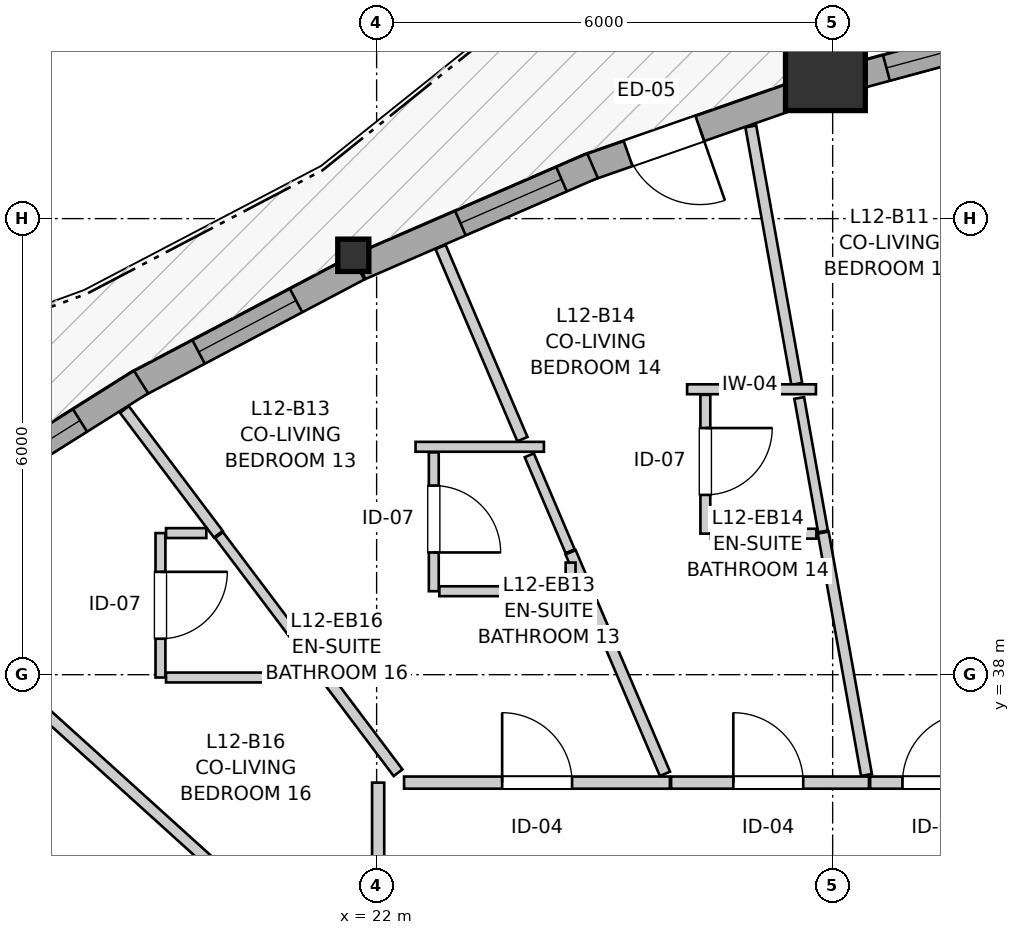
"""IFC4 building model, lengths in metres.
Left out: names, types, materials, properties, quantities, classifications, styles, units other than length and angle.
Written with IfcOpenShell. Run it as: python <this file> out.ifc"""

import sys

from ifc_helpers import new_model, si_unit, direction, frame, frame_2d, origin, origin_2d, place, context, subcontext, project, spatial, rectangle, i_section, extrude, source, transform, mapped, element, fill, save


model = new_model("IFC4")
c1 = context("Model", 3, precision=1e-05, world=origin(), true_north=direction((0.0, 1.0)))
c2 = subcontext(c1, "Body", "Model", "MODEL_VIEW")
j1 = project(units=[si_unit("LENGTHUNIT", "METRE"), si_unit("PLANEANGLEUNIT", "RADIAN")], contexts=[c1])
p1 = place(None, origin())
s1 = spatial("IfcSite", under=j1, at=p1, CompositionType="ELEMENT")
p2 = place(p1, origin())
s2 = spatial("IfcBuilding", under=s1, at=p2, CompositionType="ELEMENT")
p3 = place(p2, frame((0.0, 0.0, 43.0)))
s3 = spatial("IfcBuildingStorey", under=s2, at=p3, CompositionType="ELEMENT", Elevation=43.0)
m1 = source(origin(), c2, "Body", "SweptSolid", [
    extrude(rectangle(XDim=1.05, YDim=1.05, at=origin_2d()), origin(), (0.0, 0.0, 1.0), 2.94),
])
p4 = place(p3, frame((27.905, 45.947, 0.0), z_axis=(0.0, 0.0, 1.0), x_axis=(1.0, 0.0, 0.0)))
e1 = element("IfcColumn", 1, at=p4, inside=s3, PredefinedType="COLUMN", context=c2, shape_type="MappedRepresentation", body=[
    mapped(m1, transform((0.0, 0.0, 0.0), x_axis=(1.0, 0.0, 0.0), y_axis=(0.0, 1.0, 0.0), z_axis=(0.0, 0.0, 1.0), scale=1.0)),
])
m2 = source(origin(), c2, "Body", "SweptSolid", [
    extrude(i_section(OverallWidth=0.409, OverallDepth=0.425, WebThickness=0.03, FlangeThickness=0.048, FilletRadius=0.015, at=origin_2d()), origin(), (0.0, 0.0, 1.0), 2.94),
])
p5 = place(p3, frame((21.693, 43.518, 0.0), z_axis=(0.0, 0.0, 1.0), x_axis=(1.0, 0.0, 0.0)))
e2 = element("IfcColumn", 2, at=p5, inside=s3, PredefinedType="PILASTER", context=c2, shape_type="MappedRepresentation", body=[
    mapped(m2, transform((0.0, 0.0, 0.0), x_axis=(1.0, 0.0, 0.0), y_axis=(0.0, 1.0, 0.0), z_axis=(0.0, 0.0, 1.0), scale=1.0)),
])
p6 = place(p3, frame((31.281, 46.677, 0.0), z_axis=(0.0, 0.0, 1.0), x_axis=(-0.965445661484, -0.260604441101, 0.0)))
e3 = element("IfcWall", 3, at=p6, inside=s3, PredefinedType="SOLIDWALL", context=c2, shape_type="SweptSolid", body=[
    extrude(rectangle(XDim=3.15, YDim=0.35, at=frame_2d((1.575, 0.0))), origin(), (0.0, 0.0, 1.0), 2.42),
])
p7 = place(p6, frame((0.31, 0.0, 0.82)))
e4 = element("IfcOpeningElement", 4, at=p7, cuts=e3, PredefinedType="OPENING", context=c2, shape_type="SweptSolid", body=[
    extrude(rectangle(XDim=0.58, YDim=1.35, at=frame_2d((0.29, 0.675))), frame((0.0, 0.185, 0.0), z_axis=(0.0, -1.0, 0.0), x_axis=(1.0, 0.0, 0.0)), (0.0, 0.0, 1.0), 0.37),
])
p8 = place(p6, frame((1.215, 0.0, 0.82)))
e5 = element("IfcOpeningElement", 5, at=p8, cuts=e3, PredefinedType="OPENING", context=c2, shape_type="SweptSolid", body=[
    extrude(rectangle(XDim=1.45, YDim=1.25, at=frame_2d((0.725, 0.625))), frame((0.0, 0.185, 0.0), z_axis=(0.0, -1.0, 0.0), x_axis=(1.0, 0.0, 0.0)), (0.0, 0.0, 1.0), 0.37),
])
p9 = place(p3, frame((27.679, 45.683, 0.0), z_axis=(0.0, 0.0, 1.0), x_axis=(-0.944147093892, -0.32952430122, 0.0)))
e6 = element("IfcWall", 6, at=p9, inside=s3, PredefinedType="SOLIDWALL", context=c2, shape_type="SweptSolid", body=[
    extrude(rectangle(XDim=3.094, YDim=0.35, at=frame_2d((1.547, 0.0))), origin(), (0.0, 0.0, 1.0), 2.42),
])
p10 = place(p9, frame((1.511, 0.0, 0.0)))
e7 = element("IfcOpeningElement", 7, at=p10, cuts=e6, PredefinedType="OPENING", context=c2, shape_type="SweptSolid", body=[
    extrude(rectangle(XDim=1.0, YDim=2.1, at=frame_2d((0.5, 1.05))), frame((0.0, 0.185, 0.0), z_axis=(0.0, -1.0, 0.0), x_axis=(1.0, 0.0, 0.0)), (0.0, 0.0, 1.0), 0.37),
])
p11 = place(p3, frame((24.841, 44.696, 0.0), z_axis=(0.0, 0.0, 1.0), x_axis=(-0.917061912289, -0.398744842009, 0.0)))
e8 = element("IfcWall", 8, at=p11, inside=s3, PredefinedType="SOLIDWALL", context=c2, shape_type="SweptSolid", body=[
    extrude(rectangle(XDim=3.336, YDim=0.35, at=frame_2d((1.668, 0.0))), origin(), (0.0, 0.0, 1.0), 2.42),
])
p12 = place(p11, frame((0.445, 0.0, 0.82)))
e9 = element("IfcOpeningElement", 9, at=p12, cuts=e8, PredefinedType="OPENING", context=c2, shape_type="SweptSolid", body=[
    extrude(rectangle(XDim=1.45, YDim=1.25, at=frame_2d((0.725, 0.625))), frame((0.0, 0.185, 0.0), z_axis=(0.0, -1.0, 0.0), x_axis=(1.0, 0.0, 0.0)), (0.0, 0.0, 1.0), 0.37),
])
p13 = place(p3, frame((21.757, 43.354, 0.0), z_axis=(0.0, 0.0, 1.0), x_axis=(-0.884394035355, -0.466741031224, 0.0)))
e10 = element("IfcWall", 10, at=p13, inside=s3, PredefinedType="SOLIDWALL", context=c2, shape_type="SweptSolid", body=[
    extrude(rectangle(XDim=3.317, YDim=0.35, at=frame_2d((1.659, 0.0))), origin(), (0.0, 0.0, 1.0), 2.42),
])
p14 = place(p13, frame((0.924, 0.0, 0.82)))
e11 = element("IfcOpeningElement", 11, at=p14, cuts=e10, PredefinedType="OPENING", context=c2, shape_type="SweptSolid", body=[
    extrude(rectangle(XDim=1.45, YDim=1.25, at=frame_2d((0.725, 0.625))), frame((0.0, 0.185, 0.0), z_axis=(0.0, -1.0, 0.0), x_axis=(1.0, 0.0, 0.0)), (0.0, 0.0, 1.0), 0.37),
])
p15 = place(p3, frame((18.901, 41.85, 0.0), z_axis=(0.0, 0.0, 1.0), x_axis=(-0.846436796602, -0.532489201167, 0.0)))
e12 = element("IfcWall", 12, at=p15, inside=s3, PredefinedType="SOLIDWALL", context=c2, shape_type="SweptSolid", body=[
    extrude(rectangle(XDim=3.038, YDim=0.35, at=frame_2d((1.519, 0.0))), origin(), (0.0, 0.0, 1.0), 2.42),
])
p16 = place(p15, frame((0.948, 0.0, 0.82)))
e13 = element("IfcOpeningElement", 13, at=p16, cuts=e12, PredefinedType="OPENING", context=c2, shape_type="SweptSolid", body=[
    extrude(rectangle(XDim=1.45, YDim=1.25, at=frame_2d((0.725, 0.625))), frame((0.0, 0.185, 0.0), z_axis=(0.0, -1.0, 0.0), x_axis=(1.0, 0.0, 0.0)), (0.0, 0.0, 1.0), 0.37),
])
p17 = place(p3, frame((22.361, 36.58, 0.0), z_axis=(0.0, 0.0, 1.0), x_axis=(1.0, 0.0, 0.0)))
e14 = element("IfcWall", 14, at=p17, inside=s3, PredefinedType="PARTITIONING", context=c2, shape_type="SweptSolid", body=[
    extrude(rectangle(XDim=3.498, YDim=0.16, at=frame_2d((1.749, 0.0))), origin(), (0.0, 0.0, 1.0), 2.548),
])
p18 = place(p17, frame((1.291, 0.0, 0.0)))
e15 = element("IfcOpeningElement", 15, at=p18, cuts=e14, PredefinedType="OPENING", context=c2, shape_type="SweptSolid", body=[
    extrude(rectangle(XDim=0.92, YDim=2.1, at=frame_2d((0.46, 1.05))), frame((0.0, 0.09, 0.0), z_axis=(0.0, -1.0, 0.0), x_axis=(1.0, 0.0, 0.0)), (0.0, 0.0, 1.0), 0.18),
])
p19 = place(p3, frame((22.02, 33.512, 0.0), z_axis=(0.0, 0.0, 1.0), x_axis=(0.0, 1.0, 0.0)))
e16 = element("IfcWall", 16, at=p19, inside=s3, PredefinedType="PARTITIONING", context=c2, shape_type="SweptSolid", body=[
    extrude(rectangle(XDim=3.068, YDim=0.16, at=frame_2d((1.534, 0.0))), origin(), (0.0, 0.0, 1.0), 2.94),
])
p20 = place(p19, frame((1.084, 0.0, 0.0)))
e17 = element("IfcOpeningElement", 17, at=p20, cuts=e16, PredefinedType="OPENING", context=c2, shape_type="SweptSolid", body=[
    extrude(rectangle(XDim=0.92, YDim=2.1, at=frame_2d((0.46, 1.05))), frame((0.0, 0.09, 0.0), z_axis=(0.0, -1.0, 0.0), x_axis=(1.0, 0.0, 0.0)), (0.0, 0.0, 1.0), 0.18),
])
p21 = place(p3, frame((25.874, 36.58, 0.0), z_axis=(0.0, 0.0, 1.0), x_axis=(1.0, 0.0, 0.0)))
e18 = element("IfcWall", 18, at=p21, inside=s3, PredefinedType="PARTITIONING", context=c2, shape_type="SweptSolid", body=[
    extrude(rectangle(XDim=2.604, YDim=0.16, at=frame_2d((1.302, 0.0))), origin(), (0.0, 0.0, 1.0), 2.94),
])
p22 = place(p21, frame((0.819, 0.0, 0.0)))
e19 = element("IfcOpeningElement", 19, at=p22, cuts=e18, PredefinedType="OPENING", context=c2, shape_type="SweptSolid", body=[
    extrude(rectangle(XDim=0.92, YDim=2.1, at=frame_2d((0.46, 1.05))), frame((0.0, 0.09, 0.0), z_axis=(0.0, -1.0, 0.0), x_axis=(1.0, 0.0, 0.0)), (0.0, 0.0, 1.0), 0.18),
])
p23 = place(p3, frame((26.325, 41.682, 0.0), z_axis=(0.0, 0.0, 1.0), x_axis=(0.0, -1.0, 0.0)))
e20 = element("IfcWall", 20, at=p23, inside=s3, PredefinedType="PARTITIONING", context=c2, shape_type="SweptSolid", body=[
    extrude(rectangle(XDim=1.827, YDim=0.13, at=frame_2d((0.914, 0.0))), origin(), (0.0, 0.0, 1.0), 2.94),
])
p24 = place(p23, frame((0.437, 0.0, 0.0)))
e21 = element("IfcOpeningElement", 21, at=p24, cuts=e20, PredefinedType="OPENING", context=c2, shape_type="SweptSolid", body=[
    extrude(rectangle(XDim=0.88, YDim=2.05, at=frame_2d((0.44, 1.025))), frame((0.0, 0.075, 0.0), z_axis=(0.0, -1.0, 0.0), x_axis=(1.0, 0.0, 0.0)), (0.0, 0.0, 1.0), 0.15),
])
p25 = place(p3, frame((22.752, 40.925, 0.0), z_axis=(0.0, 0.0, 1.0), x_axis=(0.0, -1.0, 0.0)))
e22 = element("IfcWall", 22, at=p25, inside=s3, PredefinedType="PARTITIONING", context=c2, shape_type="SweptSolid", body=[
    extrude(rectangle(XDim=1.827, YDim=0.13, at=frame_2d((0.914, 0.0))), origin(), (0.0, 0.0, 1.0), 2.94),
])
p26 = place(p25, frame((0.437, 0.0, 0.0)))
e23 = element("IfcOpeningElement", 23, at=p26, cuts=e22, PredefinedType="OPENING", context=c2, shape_type="SweptSolid", body=[
    extrude(rectangle(XDim=0.88, YDim=2.05, at=frame_2d((0.44, 1.025))), frame((0.0, 0.075, 0.0), z_axis=(0.0, -1.0, 0.0), x_axis=(1.0, 0.0, 0.0)), (0.0, 0.0, 1.0), 0.15),
])
p27 = place(p3, frame((19.156, 39.863, 0.0), z_axis=(0.0, 0.0, 1.0), x_axis=(0.0, -1.0, 0.0)))
e24 = element("IfcWall", 24, at=p27, inside=s3, PredefinedType="PARTITIONING", context=c2, shape_type="SweptSolid", body=[
    extrude(rectangle(XDim=1.9, YDim=0.13, at=frame_2d((0.95, 0.0))), origin(), (0.0, 0.0, 1.0), 2.94),
])
p28 = place(p27, frame((0.51, 0.0, 0.0)))
e25 = element("IfcOpeningElement", 25, at=p28, cuts=e24, PredefinedType="OPENING", context=c2, shape_type="SweptSolid", body=[
    extrude(rectangle(XDim=0.88, YDim=2.05, at=frame_2d((0.44, 1.025))), frame((0.0, 0.075, 0.0), z_axis=(0.0, -1.0, 0.0), x_axis=(1.0, 0.0, 0.0)), (0.0, 0.0, 1.0), 0.15),
])
p29 = place(p3, frame((28.493, 36.58, 0.0), z_axis=(0.0, 0.0, 1.0), x_axis=(1.0, 0.0, 0.0)))
e26 = element("IfcWall", 26, at=p29, inside=s3, PredefinedType="PARTITIONING", context=c2, shape_type="SweptSolid", body=[
    extrude(rectangle(XDim=1.816, YDim=0.16, at=frame_2d((0.908, 0.0))), origin(), (0.0, 0.0, 1.0), 2.94),
])
p30 = place(p29, frame((0.426, 0.0, 0.0)))
e27 = element("IfcOpeningElement", 27, at=p30, cuts=e26, PredefinedType="OPENING", context=c2, shape_type="SweptSolid", body=[
    extrude(rectangle(XDim=0.92, YDim=2.1, at=frame_2d((0.46, 1.05))), frame((0.0, 0.09, 0.0), z_axis=(0.0, -1.0, 0.0), x_axis=(1.0, 0.0, 0.0)), (0.0, 0.0, 1.0), 0.18),
])
p31 = place(p3, frame((12.85, 37.347, 0.0), z_axis=(0.0, 0.0, 1.0), x_axis=(0.839070272759, -0.544023048567, 0.0)))
e28 = element("IfcWall", 28, at=p31, inside=s3, PredefinedType="PARTITIONING", context=c2, shape_type="SweptSolid", body=[
    extrude(rectangle(XDim=10.779, YDim=0.145, at=frame_2d((5.389, 0.0))), origin(), (0.0, 0.0, 1.0), 2.94),
])
p32 = place(p3, frame((15.516, 39.413, 0.0), z_axis=(0.0, 0.0, 1.0), x_axis=(0.741796419009, -0.670625135784, 0.0)))
e29 = element("IfcWall", 29, at=p32, inside=s3, PredefinedType="PARTITIONING", context=c2, shape_type="SweptSolid", body=[
    extrude(rectangle(XDim=8.586, YDim=0.145, at=frame_2d((4.293, 0.0))), origin(), (0.0, 0.0, 1.0), 2.94),
])
p33 = place(p3, frame((26.923, 45.213, 0.0), z_axis=(0.0, 0.0, 1.0), x_axis=(0.175687492323, -0.98444598889, 0.0)))
e30 = element("IfcWall", 30, at=p33, inside=s3, PredefinedType="PARTITIONING", context=c2, shape_type="SweptSolid", body=[
    extrude(rectangle(XDim=3.441, YDim=0.145, at=frame_2d((1.72, 0.0))), origin(), (0.0, 0.0, 1.0), 2.94),
])
p34 = place(p3, frame((27.876, 39.87, 0.0), z_axis=(0.0, 0.0, 1.0), x_axis=(0.175655014507, -0.984451784436, 0.0)))
e31 = element("IfcWall", 31, at=p34, inside=s3, PredefinedType="PARTITIONING", context=c2, shape_type="SweptSolid", body=[
    extrude(rectangle(XDim=3.24, YDim=0.145, at=frame_2d((1.62, 0.0))), origin(), (0.0, 0.0, 1.0), 2.94),
])
p35 = place(p3, frame((24.552, 39.61, 0.0), z_axis=(0.0, 0.0, 1.0), x_axis=(0.391974411108, -0.919976119819, 0.0)))
e32 = element("IfcWall", 32, at=p35, inside=s3, PredefinedType="PARTITIONING", context=c2, shape_type="SweptSolid", body=[
    extrude(rectangle(XDim=3.168, YDim=0.145, at=frame_2d((1.584, 0.0))), origin(), (0.0, 0.0, 1.0), 2.94),
])
p36 = place(p3, frame((22.841, 43.626, 0.0), z_axis=(0.0, 0.0, 1.0), x_axis=(0.392030625658, -0.919952166445, 0.0)))
e33 = element("IfcWall", 33, at=p36, inside=s3, PredefinedType="PARTITIONING", context=c2, shape_type="SweptSolid", body=[
    extrude(rectangle(XDim=2.747, YDim=0.145, at=frame_2d((1.374, 0.0))), origin(), (0.0, 0.0, 1.0), 2.94),
])
p37 = place(p3, frame((20.941, 38.49, 0.0), z_axis=(0.0, 0.0, 1.0), x_axis=(0.601733790382, -0.798696716853, 0.0)))
e34 = element("IfcWall", 34, at=p37, inside=s3, PredefinedType="PARTITIONING", context=c2, shape_type="SweptSolid", body=[
    extrude(rectangle(XDim=2.229, YDim=0.145, at=frame_2d((1.114, 0.0))), origin(), (0.0, 0.0, 1.0), 2.94),
])
p38 = place(p3, frame((18.681, 41.489, 0.0), z_axis=(0.0, 0.0, 1.0), x_axis=(0.601842551228, -0.79861476541, 0.0)))
e35 = element("IfcWall", 35, at=p38, inside=s3, PredefinedType="PARTITIONING", context=c2, shape_type="SweptSolid", body=[
    extrude(rectangle(XDim=2.055, YDim=0.145, at=frame_2d((1.027, 0.0))), origin(), (0.0, 0.0, 1.0), 2.94),
])
p39 = place(p3, frame((27.56, 41.641, 0.0), z_axis=(0.0, 0.0, 1.0), x_axis=(0.175463771609, -0.9844858886, 0.0)))
e36 = element("IfcWall", 36, at=p39, inside=s3, PredefinedType="PARTITIONING", context=c2, shape_type="SweptSolid", body=[
    extrude(rectangle(XDim=1.784, YDim=0.13, at=frame_2d((0.892, 0.0))), origin(), (0.0, 0.0, 1.0), 2.94),
])
p40 = place(p3, frame((22.825, 39.098, 0.0), z_axis=(0.0, 0.0, 1.0), x_axis=(1.0, 0.0, 0.0)))
e37 = element("IfcWall", 37, at=p40, inside=s3, PredefinedType="PARTITIONING", context=c2, shape_type="SweptSolid", body=[
    extrude(rectangle(XDim=1.727, YDim=0.13, at=frame_2d((0.864, 0.0))), origin(), (0.0, 0.0, 1.0), 2.94),
])
p41 = place(p3, frame((19.229, 37.963, 0.0), z_axis=(0.0, 0.0, 1.0), x_axis=(1.0, 0.0, 0.0)))
e38 = element("IfcWall", 38, at=p41, inside=s3, PredefinedType="PARTITIONING", context=c2, shape_type="SweptSolid", body=[
    extrude(rectangle(XDim=1.727, YDim=0.13, at=frame_2d((0.864, 0.0))), origin(), (0.0, 0.0, 1.0), 2.508),
])
p42 = place(p3, frame((19.927, 39.836, 0.0), z_axis=(0.0, 0.0, 1.0), x_axis=(0.601846185739, -0.798612026401, 0.0)))
e39 = element("IfcWall", 39, at=p42, inside=s3, PredefinedType="PARTITIONING", context=c2, shape_type="SweptSolid", body=[
    extrude(rectangle(XDim=1.67, YDim=0.13, at=frame_2d((0.835, 0.0))), origin(), (0.0, 0.0, 1.0), 2.94),
])
p43 = place(p3, frame((26.398, 39.855, 0.0), z_axis=(0.0, 0.0, 1.0), x_axis=(1.0, 0.0, 0.0)))
e40 = element("IfcWall", 40, at=p43, inside=s3, PredefinedType="PARTITIONING", context=c2, shape_type="SweptSolid", body=[
    extrude(rectangle(XDim=1.388, YDim=0.13, at=frame_2d((0.694, 0.0))), origin(), (0.0, 0.0, 1.0), 2.94),
])
p44 = place(p3, frame((24.009, 40.886, 0.0), z_axis=(0.0, 0.0, 1.0), x_axis=(0.39172821254, -0.920080978773, 0.0)))
e41 = element("IfcWall", 41, at=p44, inside=s3, PredefinedType="PARTITIONING", context=c2, shape_type="SweptSolid", body=[
    extrude(rectangle(XDim=1.372, YDim=0.13, at=frame_2d((0.686, 0.0))), origin(), (0.0, 0.0, 1.0), 2.94),
])
p45 = place(p3, frame((26.085, 41.755, 0.0), z_axis=(0.0, 0.0, 1.0), x_axis=(1.0, 0.0, 0.0)))
e42 = element("IfcWall", 42, at=p45, inside=s3, PredefinedType="PARTITIONING", context=c2, shape_type="SweptSolid", body=[
    extrude(rectangle(XDim=1.695, YDim=0.13, at=frame_2d((0.848, 0.0))), origin(), (0.0, 0.0, 1.0), 2.508),
])
p46 = place(p3, frame((22.512, 40.998, 0.0), z_axis=(0.0, 0.0, 1.0), x_axis=(1.0, 0.0, 0.0)))
e43 = element("IfcWall", 43, at=p46, inside=s3, PredefinedType="PARTITIONING", context=c2, shape_type="SweptSolid", body=[
    extrude(rectangle(XDim=1.689, YDim=0.13, at=frame_2d((0.844, 0.0))), origin(), (0.0, 0.0, 1.0), 2.94),
])
p47 = place(p3, frame((19.229, 39.863, 0.0), z_axis=(0.0, 0.0, 1.0), x_axis=(1.0, 0.0, 0.0)))
e44 = element("IfcWall", 44, at=p47, inside=s3, PredefinedType="PARTITIONING", context=c2, shape_type="SweptSolid", body=[
    extrude(rectangle(XDim=0.53, YDim=0.13, at=frame_2d((0.265, 0.0))), origin(), (0.0, 0.0, 1.0), 2.94),
])
p48 = place(p3, frame((24.552, 39.098, 0.0), z_axis=(0.0, 0.0, 1.0), x_axis=(0.0, 1.0, 0.0)))
e45 = element("IfcWall", 45, at=p48, inside=s3, PredefinedType="PARTITIONING", context=c2, shape_type="SweptSolid", body=[
    extrude(rectangle(XDim=0.377, YDim=0.13, at=frame_2d((0.188, 0.0))), origin(), (0.0, 0.0, 1.0), 2.94),
])
p49 = place(p3, frame((20.956, 37.963, 0.0), z_axis=(0.0, 0.0, 1.0), x_axis=(0.0, 1.0, 0.0)))
e46 = element("IfcWall", 46, at=p49, inside=s3, PredefinedType="PARTITIONING", context=c2, shape_type="SweptSolid", body=[
    extrude(rectangle(XDim=0.417, YDim=0.13, at=frame_2d((0.208, 0.0))), origin(), (0.0, 0.0, 1.0), 2.94),
])
m3 = source(origin(), c2, "Body", "SweptSolid", [
    extrude(rectangle(XDim=1.45, YDim=1.25, at=frame_2d((0.725, 0.625))), frame((0.0, 0.03, 0.0), z_axis=(0.0, -1.0, 0.0), x_axis=(1.0, 0.0, 0.0)), (0.0, 0.0, 1.0), 0.06),
])
p50 = place(p8, origin())
e47 = element("IfcWindow", 47, at=p50, inside=s3, PartitioningType="SINGLE_PANEL", PredefinedType="WINDOW", context=c2, shape_type="MappedRepresentation", body=[
    mapped(m3, transform((0.0, 0.0, 0.0), x_axis=(1.0, 0.0, 0.0), y_axis=(0.0, 1.0, 0.0), z_axis=(0.0, 0.0, 1.0), scale=1.0)),
])
fill(e5, e47)
p51 = place(p12, origin())
e48 = element("IfcWindow", 48, at=p51, inside=s3, PartitioningType="SINGLE_PANEL", PredefinedType="WINDOW", context=c2, shape_type="MappedRepresentation", body=[
    mapped(m3, transform((0.0, 0.0, 0.0), x_axis=(1.0, 0.0, 0.0), y_axis=(0.0, 1.0, 0.0), z_axis=(0.0, 0.0, 1.0), scale=1.0)),
])
fill(e9, e48)
p52 = place(p14, origin())
e49 = element("IfcWindow", 49, at=p52, inside=s3, PartitioningType="SINGLE_PANEL", PredefinedType="WINDOW", context=c2, shape_type="MappedRepresentation", body=[
    mapped(m3, transform((0.0, 0.0, 0.0), x_axis=(1.0, 0.0, 0.0), y_axis=(0.0, 1.0, 0.0), z_axis=(0.0, 0.0, 1.0), scale=1.0)),
])
fill(e11, e49)
p53 = place(p16, origin())
e50 = element("IfcWindow", 50, at=p53, inside=s3, PartitioningType="SINGLE_PANEL", PredefinedType="WINDOW", context=c2, shape_type="MappedRepresentation", body=[
    mapped(m3, transform((0.0, 0.0, 0.0), x_axis=(1.0, 0.0, 0.0), y_axis=(0.0, 1.0, 0.0), z_axis=(0.0, 0.0, 1.0), scale=1.0)),
])
fill(e13, e50)
m4 = source(origin(), c2, "Body", "SweptSolid", [
    extrude(rectangle(XDim=1.0, YDim=2.1, at=frame_2d((0.5, 1.05))), frame((0.0, 0.025, 0.0), z_axis=(0.0, -1.0, 0.0), x_axis=(1.0, 0.0, 0.0)), (0.0, 0.0, 1.0), 0.05),
])
p54 = place(p10, origin())
e51 = element("IfcDoor", 51, at=p54, inside=s3, OperationType="SINGLE_SWING_LEFT", PredefinedType="DOOR", context=c2, shape_type="MappedRepresentation", body=[
    mapped(m4, transform((0.0, 0.0, 0.0), x_axis=(1.0, 0.0, 0.0), y_axis=(0.0, 1.0, 0.0), z_axis=(0.0, 0.0, 1.0), scale=1.0)),
])
fill(e7, e51)
m5 = source(origin(), c2, "Body", "SweptSolid", [
    extrude(rectangle(XDim=0.92, YDim=2.1, at=frame_2d((0.46, 1.05))), frame((0.0, 0.025, 0.0), z_axis=(0.0, -1.0, 0.0), x_axis=(1.0, 0.0, 0.0)), (0.0, 0.0, 1.0), 0.05),
])
p55 = place(p18, origin())
e52 = element("IfcDoor", 52, at=p55, inside=s3, OperationType="SINGLE_SWING_LEFT", PredefinedType="DOOR", context=c2, shape_type="MappedRepresentation", body=[
    mapped(m5, transform((0.0, 0.0, 0.0), x_axis=(1.0, 0.0, 0.0), y_axis=(0.0, 1.0, 0.0), z_axis=(0.0, 0.0, 1.0), scale=1.0)),
])
fill(e15, e52)
p56 = place(p22, origin())
e53 = element("IfcDoor", 53, at=p56, inside=s3, OperationType="SINGLE_SWING_LEFT", PredefinedType="DOOR", context=c2, shape_type="MappedRepresentation", body=[
    mapped(m5, transform((0.0, 0.0, 0.0), x_axis=(1.0, 0.0, 0.0), y_axis=(0.0, 1.0, 0.0), z_axis=(0.0, 0.0, 1.0), scale=1.0)),
])
fill(e19, e53)
m6 = source(origin(), c2, "Body", "SweptSolid", [
    extrude(rectangle(XDim=0.88, YDim=2.05, at=frame_2d((0.44, 1.025))), frame((0.0, 0.025, 0.0), z_axis=(0.0, -1.0, 0.0), x_axis=(1.0, 0.0, 0.0)), (0.0, 0.0, 1.0), 0.05),
])
p57 = place(p24, origin())
e54 = element("IfcDoor", 54, at=p57, inside=s3, OperationType="SINGLE_SWING_LEFT", PredefinedType="DOOR", context=c2, shape_type="MappedRepresentation", body=[
    mapped(m6, transform((0.0, 0.0, 0.0), x_axis=(1.0, 0.0, 0.0), y_axis=(0.0, 1.0, 0.0), z_axis=(0.0, 0.0, 1.0), scale=1.0)),
])
fill(e21, e54)
p58 = place(p26, origin())
e55 = element("IfcDoor", 55, at=p58, inside=s3, OperationType="SINGLE_SWING_RIGHT", PredefinedType="DOOR", context=c2, shape_type="MappedRepresentation", body=[
    mapped(m6, transform((0.0, 0.0, 0.0), x_axis=(1.0, 0.0, 0.0), y_axis=(0.0, 1.0, 0.0), z_axis=(0.0, 0.0, 1.0), scale=1.0)),
])
fill(e23, e55)
p59 = place(p28, origin())
e56 = element("IfcDoor", 56, at=p59, inside=s3, OperationType="SINGLE_SWING_LEFT", PredefinedType="DOOR", context=c2, shape_type="MappedRepresentation", body=[
    mapped(m6, transform((0.0, 0.0, 0.0), x_axis=(1.0, 0.0, 0.0), y_axis=(0.0, 1.0, 0.0), z_axis=(0.0, 0.0, 1.0), scale=1.0)),
])
fill(e25, e56)
p60 = place(p30, origin())
e57 = element("IfcDoor", 57, at=p60, inside=s3, OperationType="SINGLE_SWING_RIGHT", PredefinedType="DOOR", context=c2, shape_type="MappedRepresentation", body=[
    mapped(m5, transform((0.0, 0.0, 0.0), x_axis=(1.0, 0.0, 0.0), y_axis=(0.0, 1.0, 0.0), z_axis=(0.0, 0.0, 1.0), scale=1.0)),
])
fill(e27, e57)
save(model, sys.argv[1])
